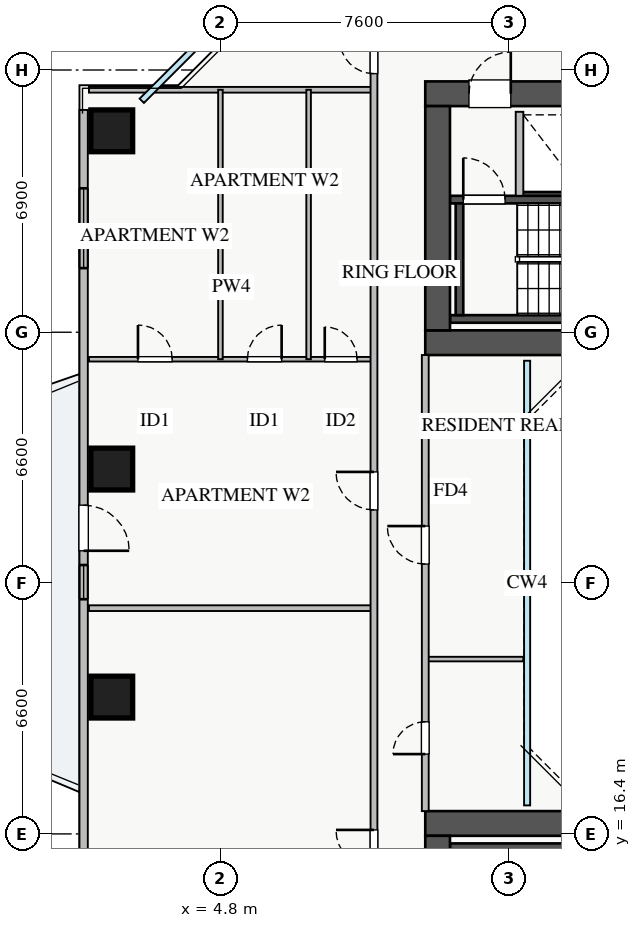
"""IFC4 building model, lengths in metres.
Left out: names, types, materials, properties, quantities, classifications, styles, units other than length and angle.
Written with IfcOpenShell. Run it as: python <this file> out.ifc"""

import sys

from ifc_helpers import new_model, si_unit, direction, frame, frame_2d, origin, origin_2d, place, context, subcontext, project, spatial, rectangle, extrude, source, transform, mapped, element, fill, save


model = new_model("IFC4")
c1 = context("Model", 3, precision=1e-05, world=origin(), true_north=direction((0.0, 1.0)))
c2 = subcontext(c1, "Body", "Model", "MODEL_VIEW")
j1 = project(units=[si_unit("LENGTHUNIT", "METRE"), si_unit("PLANEANGLEUNIT", "RADIAN")], contexts=[c1])
p1 = place(None, origin())
s1 = spatial("IfcSite", under=j1, at=p1, CompositionType="ELEMENT")
p2 = place(p1, origin())
s2 = spatial("IfcBuilding", under=s1, at=p2, CompositionType="ELEMENT")
p3 = place(p2, frame((0.0, 0.0, 113.25)))
s3 = spatial("IfcBuildingStorey", under=s2, at=p3, CompositionType="ELEMENT", Elevation=113.25)
p4 = place(p3, frame((12.68, 33.2, 0.0), z_axis=(0.0, 0.0, 1.0), x_axis=(1.0, 0.0, 0.0)))
e1 = element("IfcWall", 1, at=p4, inside=s3, PredefinedType="SHEAR", context=c2, shape_type="SweptSolid", body=[
    extrude(rectangle(XDim=1.94, YDim=0.18, at=frame_2d((0.97, 0.0))), origin(), (0.0, 0.0, 1.0), 3.07),
])
p5 = place(p3, frame((10.85, 29.95, 0.0), z_axis=(0.0, 0.0, 1.0), x_axis=(1.0, 0.0, 0.0)))
e2 = element("IfcWall", 2, at=p5, inside=s3, PredefinedType="SHEAR", context=c2, shape_type="SweptSolid", body=[
    extrude(rectangle(XDim=7.3, YDim=0.2, at=frame_2d((3.65, 0.0))), origin(), (0.0, 0.0, 1.0), 3.25),
])
p6 = place(p3, frame((10.85, 33.09, 0.0), z_axis=(0.0, 0.0, 1.0), x_axis=(1.0, 0.0, 0.0)))
e3 = element("IfcWall", 3, at=p6, inside=s3, PredefinedType="SHEAR", context=c2, shape_type="SweptSolid", body=[
    extrude(rectangle(XDim=7.3, YDim=0.2, at=frame_2d((3.65, 0.0))), origin(), (0.0, 0.0, 1.0), 3.25),
])
p7 = place(p6, frame((0.35, 0.0, 0.0)))
e4 = element("IfcOpeningElement", 4, at=p7, cuts=e3, PredefinedType="OPENING", context=c2, shape_type="SweptSolid", body=[
    extrude(rectangle(XDim=1.1, YDim=2.05, at=frame_2d((0.55, 1.025))), frame((0.0, 0.11, 0.0), z_axis=(0.0, -1.0, 0.0), x_axis=(1.0, 0.0, 0.0)), (0.0, 0.0, 1.0), 0.22),
])
p8 = place(p3, frame((11.1, 30.05, 0.0), z_axis=(0.0, 0.0, 1.0), x_axis=(0.0, 1.0, 0.0)))
e5 = element("IfcWall", 5, at=p8, inside=s3, PredefinedType="SHEAR", context=c2, shape_type="SweptSolid", body=[
    extrude(rectangle(XDim=2.94, YDim=0.2, at=frame_2d((1.47, 0.0))), origin(), (0.0, 0.0, 1.0), 3.25),
])
p9 = place(p3, frame((10.85, 16.05, 0.0), z_axis=(0.0, 0.0, 1.0), x_axis=(1.0, 0.0, 0.0)))
e6 = element("IfcWall", 6, at=p9, inside=s3, PredefinedType="SHEAR", context=c2, shape_type="SweptSolid", body=[
    extrude(rectangle(XDim=7.3, YDim=0.2, at=frame_2d((3.65, 0.0))), origin(), (0.0, 0.0, 1.0), 3.25),
])
p10 = place(p3, frame((10.2, 29.325, 0.0), z_axis=(0.0, 0.0, 1.0), x_axis=(1.0, 0.0, 0.0)))
e7 = element("IfcWall", 7, at=p10, inside=s3, PredefinedType="SHEAR", context=c2, shape_type="SweptSolid", body=[
    extrude(rectangle(XDim=17.6, YDim=0.65, at=frame_2d((8.8, 0.0))), origin(), (0.0, 0.0, 1.0), 3.25),
])
p11 = place(p3, frame((10.2, 35.875, 0.0), z_axis=(0.0, 0.0, 1.0), x_axis=(1.0, 0.0, 0.0)))
e8 = element("IfcWall", 8, at=p11, inside=s3, PredefinedType="SHEAR", context=c2, shape_type="SweptSolid", body=[
    extrude(rectangle(XDim=17.6, YDim=0.65, at=frame_2d((8.8, 0.0))), origin(), (0.0, 0.0, 1.0), 3.25),
])
p12 = place(p11, frame((1.15, 0.0, 0.0)))
e9 = element("IfcOpeningElement", 9, at=p12, cuts=e8, PredefinedType="OPENING", context=c2, shape_type="SweptSolid", body=[
    extrude(rectangle(XDim=1.1, YDim=2.05, at=frame_2d((0.55, 1.025))), frame((0.0, 0.335, 0.0), z_axis=(0.0, -1.0, 0.0), x_axis=(1.0, 0.0, 0.0)), (0.0, 0.0, 1.0), 0.67),
])
p13 = place(p11, frame((8.3, 0.0, 0.0)))
e10 = element("IfcOpeningElement", 10, at=p13, cuts=e8, PredefinedType="OPENING", context=c2, shape_type="SweptSolid", body=[
    extrude(rectangle(XDim=1.1, YDim=2.05, at=frame_2d((0.55, 1.025))), frame((0.0, 0.335, 0.0), z_axis=(0.0, -1.0, 0.0), x_axis=(1.0, 0.0, 0.0)), (0.0, 0.0, 1.0), 0.67),
])
p14 = place(p11, frame((4.9, 0.0, 0.0)))
e11 = element("IfcOpeningElement", 11, at=p14, cuts=e8, PredefinedType="OPENING", context=c2, shape_type="SweptSolid", body=[
    extrude(rectangle(XDim=1.1, YDim=2.05, at=frame_2d((0.55, 1.025))), frame((0.0, 0.335, 0.0), z_axis=(0.0, -1.0, 0.0), x_axis=(1.0, 0.0, 0.0)), (0.0, 0.0, 1.0), 0.67),
])
p15 = place(p11, frame((14.74, 0.0, 0.0)))
e12 = element("IfcOpeningElement", 12, at=p15, cuts=e8, PredefinedType="OPENING", context=c2, shape_type="SweptSolid", body=[
    extrude(rectangle(XDim=1.0, YDim=2.05, at=frame_2d((0.5, 1.025))), frame((0.0, 0.335, 0.0), z_axis=(0.0, -1.0, 0.0), x_axis=(1.0, 0.0, 0.0)), (0.0, 0.0, 1.0), 0.67),
])
p16 = place(p11, frame((10.005, 0.0, 0.0)))
e13 = element("IfcOpeningElement", 13, at=p16, cuts=e8, PredefinedType="OPENING", context=c2, shape_type="SweptSolid", body=[
    extrude(rectangle(XDim=1.0, YDim=2.05, at=frame_2d((0.5, 1.025))), frame((0.0, 0.335, 0.0), z_axis=(0.0, -1.0, 0.0), x_axis=(1.0, 0.0, 0.0)), (0.0, 0.0, 1.0), 0.67),
])
p17 = place(p11, frame((11.55, 0.0, 0.0)))
e14 = element("IfcOpeningElement", 14, at=p17, cuts=e8, PredefinedType="OPENING", context=c2, shape_type="SweptSolid", body=[
    extrude(rectangle(XDim=1.0, YDim=2.05, at=frame_2d((0.5, 1.025))), frame((0.0, 0.335, 0.0), z_axis=(0.0, -1.0, 0.0), x_axis=(1.0, 0.0, 0.0)), (0.0, 0.0, 1.0), 0.67),
])
p18 = place(p11, frame((13.215, 0.0, 0.0)))
e15 = element("IfcOpeningElement", 15, at=p18, cuts=e8, PredefinedType="OPENING", context=c2, shape_type="SweptSolid", body=[
    extrude(rectangle(XDim=1.0, YDim=2.05, at=frame_2d((0.5, 1.025))), frame((0.0, 0.335, 0.0), z_axis=(0.0, -1.0, 0.0), x_axis=(1.0, 0.0, 0.0)), (0.0, 0.0, 1.0), 0.67),
])
p19 = place(p3, frame((10.525, 29.65, 0.0), z_axis=(0.0, 0.0, 1.0), x_axis=(0.0, 1.0, 0.0)))
e16 = element("IfcWall", 16, at=p19, inside=s3, PredefinedType="SHEAR", context=c2, shape_type="SweptSolid", body=[
    extrude(rectangle(XDim=5.9, YDim=0.65, at=frame_2d((2.95, 0.0))), origin(), (0.0, 0.0, 1.0), 3.25),
])
p20 = place(p3, frame((10.2, 16.675, 0.0), z_axis=(0.0, 0.0, 1.0), x_axis=(1.0, 0.0, 0.0)))
e17 = element("IfcWall", 17, at=p20, inside=s3, PredefinedType="SHEAR", context=c2, shape_type="SweptSolid", body=[
    extrude(rectangle(XDim=17.6, YDim=0.65, at=frame_2d((8.8, 0.0))), origin(), (0.0, 0.0, 1.0), 3.25),
])
p21 = place(p3, frame((10.525, 10.45, 0.0), z_axis=(0.0, 0.0, 1.0), x_axis=(0.0, 1.0, 0.0)))
e18 = element("IfcWall", 18, at=p21, inside=s3, PredefinedType="SHEAR", context=c2, shape_type="SweptSolid", body=[
    extrude(rectangle(XDim=5.9, YDim=0.65, at=frame_2d((2.95, 0.0))), origin(), (0.0, 0.0, 1.0), 3.25),
])
m1 = source(origin(), c2, "Body", "SweptSolid", [
    extrude(rectangle(XDim=1.1, YDim=1.1, at=origin_2d()), origin(), (0.0, 0.0, 1.0), 3.25),
])
for number, where, z_axis, x_axis in (
    (19, (1.95, 34.9, 0.0), (0.0, 0.0, 1.0), (1.0, 0.0, 0.0)),
    (20, (1.95, 26.0, 0.0), (0.0, 0.0, 1.0), (1.0, 0.0, 0.0)),
    (21, (1.95, 20.0, 0.0), (0.0, 0.0, 1.0), (1.0, 0.0, 0.0)),
):
    element("IfcColumn", number, at=place(p3, frame(where, z_axis=z_axis, x_axis=x_axis)), inside=s3, PredefinedType="COLUMN", context=c2, shape_type="MappedRepresentation", body=[
        mapped(m1, transform((0.0, 0.0, 0.0), x_axis=(1.0, 0.0, 0.0), y_axis=(0.0, 1.0, 0.0), z_axis=(0.0, 0.0, 1.0), scale=1.0)),
    ])
p22 = place(p3, frame((1.21, 10.55, 0.0), z_axis=(0.0, 0.0, 1.0), x_axis=(0.0, 1.0, 0.0)))
e22 = element("IfcWall", 22, at=p22, inside=s3, PredefinedType="STANDARD", context=c2, shape_type="SweptSolid", body=[
    extrude(rectangle(XDim=24.9, YDim=0.22, at=frame_2d((12.45, 0.0))), origin(), (0.0, 0.0, 1.0), 2.61),
])
p23 = place(p22, frame((13.3, 0.0, 0.0)))
e23 = element("IfcOpeningElement", 23, at=p23, cuts=e22, PredefinedType="OPENING", context=c2, shape_type="SweptSolid", body=[
    extrude(rectangle(XDim=1.2, YDim=2.1, at=frame_2d((0.6, 1.05))), frame((0.0, 0.12, 0.0), z_axis=(0.0, -1.0, 0.0), x_axis=(1.0, 0.0, 0.0)), (0.0, 0.0, 1.0), 0.24),
])
p24 = place(p22, frame((1.912, 0.0, 0.9)))
e24 = element("IfcOpeningElement", 24, at=p24, cuts=e22, PredefinedType="OPENING", context=c2, shape_type="SweptSolid", body=[
    extrude(rectangle(XDim=2.4, YDim=1.48, at=frame_2d((1.2, 0.74))), frame((0.0, 0.12, 0.0), z_axis=(0.0, -1.0, 0.0), x_axis=(1.0, 0.0, 0.0)), (0.0, 0.0, 1.0), 0.24),
])
p25 = place(p22, frame((20.737, 0.0, 0.9)))
e25 = element("IfcOpeningElement", 25, at=p25, cuts=e22, PredefinedType="OPENING", context=c2, shape_type="SweptSolid", body=[
    extrude(rectangle(XDim=2.1, YDim=1.48, at=frame_2d((1.05, 0.74))), frame((0.0, 0.12, 0.0), z_axis=(0.0, -1.0, 0.0), x_axis=(1.0, 0.0, 0.0)), (0.0, 0.0, 1.0), 0.24),
])
p26 = place(p22, frame((12.025, 0.0, 0.9)))
e26 = element("IfcOpeningElement", 26, at=p26, cuts=e22, PredefinedType="OPENING", context=c2, shape_type="SweptSolid", body=[
    extrude(rectangle(XDim=0.9, YDim=1.2, at=frame_2d((0.45, 0.6))), frame((0.0, 0.12, 0.0), z_axis=(0.0, -1.0, 0.0), x_axis=(1.0, 0.0, 0.0)), (0.0, 0.0, 1.0), 0.24),
])
p27 = place(p3, frame((12.68, 33.19, 0.0), z_axis=(0.0, 0.0, 1.0), x_axis=(0.0, 1.0, 0.0)))
e27 = element("IfcWall", 27, at=p27, inside=s3, PredefinedType="PARTITIONING", context=c2, shape_type="SweptSolid", body=[
    extrude(rectangle(XDim=2.21, YDim=0.2, at=frame_2d((1.105, 0.0))), origin(), (0.0, 0.0, 1.0), 3.07),
])
p28 = place(p3, frame((1.35, 35.98, 0.0), z_axis=(0.0, 0.0, 1.0), x_axis=(1.0, 0.0, 0.0)))
e28 = element("IfcWall", 28, at=p28, inside=s3, PredefinedType="PARTITIONING", context=c2, shape_type="SweptSolid", body=[
    extrude(rectangle(XDim=7.5, YDim=0.15, at=frame_2d((3.75, 0.0))), origin(), (0.0, 0.0, 1.0), 3.07),
])
p29 = place(p3, frame((1.35, 28.89, 0.0), z_axis=(0.0, 0.0, 1.0), x_axis=(1.0, 0.0, 0.0)))
e29 = element("IfcWall", 29, at=p29, inside=s3, PredefinedType="PLUMBINGWALL", context=c2, shape_type="SweptSolid", body=[
    extrude(rectangle(XDim=7.5, YDim=0.12, at=frame_2d((3.75, 0.0))), origin(), (0.0, 0.0, 1.0), 3.07),
])
p30 = place(p29, frame((1.29, 0.0, 0.0)))
e30 = element("IfcOpeningElement", 30, at=p30, cuts=e29, PredefinedType="OPENING", context=c2, shape_type="SweptSolid", body=[
    extrude(rectangle(XDim=0.9, YDim=2.05, at=frame_2d((0.45, 1.025))), frame((0.0, 0.07, 0.0), z_axis=(0.0, -1.0, 0.0), x_axis=(1.0, 0.0, 0.0)), (0.0, 0.0, 1.0), 0.14),
])
p31 = place(p29, frame((4.17, 0.0, 0.0)))
e31 = element("IfcOpeningElement", 31, at=p31, cuts=e29, PredefinedType="OPENING", context=c2, shape_type="SweptSolid", body=[
    extrude(rectangle(XDim=0.9, YDim=2.05, at=frame_2d((0.45, 1.025))), frame((0.0, 0.07, 0.0), z_axis=(0.0, -1.0, 0.0), x_axis=(1.0, 0.0, 0.0)), (0.0, 0.0, 1.0), 0.14),
])
p32 = place(p29, frame((6.205, 0.0, 0.0)))
e32 = element("IfcOpeningElement", 32, at=p32, cuts=e29, PredefinedType="OPENING", context=c2, shape_type="SweptSolid", body=[
    extrude(rectangle(XDim=0.85, YDim=2.05, at=frame_2d((0.425, 1.025))), frame((0.0, 0.07, 0.0), z_axis=(0.0, -1.0, 0.0), x_axis=(1.0, 0.0, 0.0)), (0.0, 0.0, 1.0), 0.14),
])
p33 = place(p3, frame((4.81, 28.89, 0.0), z_axis=(0.0, 0.0, 1.0), x_axis=(0.0, 1.0, 0.0)))
e33 = element("IfcWall", 33, at=p33, inside=s3, PredefinedType="PLUMBINGWALL", context=c2, shape_type="SweptSolid", body=[
    extrude(rectangle(XDim=7.09, YDim=0.12, at=frame_2d((3.545, 0.0))), origin(), (0.0, 0.0, 1.0), 3.07),
])
p34 = place(p3, frame((7.13, 28.89, 0.0), z_axis=(0.0, 0.0, 1.0), x_axis=(0.0, 1.0, 0.0)))
e34 = element("IfcWall", 34, at=p34, inside=s3, PredefinedType="PLUMBINGWALL", context=c2, shape_type="SweptSolid", body=[
    extrude(rectangle(XDim=7.09, YDim=0.12, at=frame_2d((3.545, 0.0))), origin(), (0.0, 0.0, 1.0), 2.577),
])
p35 = place(p3, frame((1.35, 22.34, 0.0), z_axis=(0.0, 0.0, 1.0), x_axis=(1.0, 0.0, 0.0)))
e35 = element("IfcWall", 35, at=p35, inside=s3, PredefinedType="PARTITIONING", context=c2, shape_type="SweptSolid", body=[
    extrude(rectangle(XDim=7.5, YDim=0.15, at=frame_2d((3.75, 0.0))), origin(), (0.0, 0.0, 1.0), 3.07),
])
p36 = place(p3, frame((8.85, 8.25, 0.0), z_axis=(0.0, 0.0, 1.0), x_axis=(0.0, 1.0, 0.0)))
e36 = element("IfcWall", 36, at=p36, inside=s3, PredefinedType="PARTITIONING", context=c2, shape_type="SweptSolid", body=[
    extrude(rectangle(XDim=29.5, YDim=0.18, at=frame_2d((14.75, 0.0))), origin(), (0.0, 0.0, 1.0), 3.07),
])
p37 = place(p36, frame((28.155, 0.0, 0.0)))
e37 = element("IfcOpeningElement", 37, at=p37, cuts=e36, PredefinedType="OPENING", context=c2, shape_type="SweptSolid", body=[
    extrude(rectangle(XDim=0.9, YDim=2.05, at=frame_2d((0.45, 1.025))), frame((0.0, 0.1, 0.0), z_axis=(0.0, -1.0, 0.0), x_axis=(1.0, 0.0, 0.0)), (0.0, 0.0, 1.0), 0.2),
])
p38 = place(p36, frame((0.27, 0.0, 0.0)))
e38 = element("IfcOpeningElement", 38, at=p38, cuts=e36, PredefinedType="OPENING", context=c2, shape_type="SweptSolid", body=[
    extrude(rectangle(XDim=0.9, YDim=2.05, at=frame_2d((0.45, 1.025))), frame((0.0, 0.1, 0.0), z_axis=(0.0, -1.0, 0.0), x_axis=(1.0, 0.0, 0.0)), (0.0, 0.0, 1.0), 0.2),
])
p39 = place(p36, frame((7.255, 0.0, 0.0)))
e39 = element("IfcOpeningElement", 39, at=p39, cuts=e36, PredefinedType="OPENING", context=c2, shape_type="SweptSolid", body=[
    extrude(rectangle(XDim=1.0, YDim=2.05, at=frame_2d((0.5, 1.025))), frame((0.0, 0.1, 0.0), z_axis=(0.0, -1.0, 0.0), x_axis=(1.0, 0.0, 0.0)), (0.0, 0.0, 1.0), 0.2),
])
p40 = place(p36, frame((16.675, 0.0, 0.0)))
e40 = element("IfcOpeningElement", 40, at=p40, cuts=e36, PredefinedType="OPENING", context=c2, shape_type="SweptSolid", body=[
    extrude(rectangle(XDim=1.0, YDim=2.05, at=frame_2d((0.5, 1.025))), frame((0.0, 0.1, 0.0), z_axis=(0.0, -1.0, 0.0), x_axis=(1.0, 0.0, 0.0)), (0.0, 0.0, 1.0), 0.2),
])
p41 = place(p3, frame((10.2, 21.0, 0.0), z_axis=(0.0, 0.0, 1.0), x_axis=(1.0, 0.0, 0.0)))
e41 = element("IfcWall", 41, at=p41, inside=s3, PredefinedType="PLUMBINGWALL", context=c2, shape_type="SweptSolid", body=[
    extrude(rectangle(XDim=2.58, YDim=0.12, at=frame_2d((1.29, 0.0))), origin(), (0.0, 0.0, 1.0), 3.07),
])
p42 = place(p3, frame((10.2, 17.0, 0.0), z_axis=(0.0, 0.0, 1.0), x_axis=(0.0, 1.0, 0.0)))
e42 = element("IfcWall", 42, at=p42, inside=s3, PredefinedType="PARTITIONING", context=c2, shape_type="SweptSolid", body=[
    extrude(rectangle(XDim=12.0, YDim=0.18, at=frame_2d((6.0, 0.0))), origin(), (0.0, 0.0, 1.0), 3.07),
])
p43 = place(p42, frame((1.5, 0.0, 0.0)))
e43 = element("IfcOpeningElement", 43, at=p43, cuts=e42, PredefinedType="OPENING", context=c2, shape_type="SweptSolid", body=[
    extrude(rectangle(XDim=0.85, YDim=2.05, at=frame_2d((0.425, 1.025))), frame((0.0, 0.1, 0.0), z_axis=(0.0, -1.0, 0.0), x_axis=(1.0, 0.0, 0.0)), (0.0, 0.0, 1.0), 0.2),
])
p44 = place(p42, frame((6.5, 0.0, 0.0)))
e44 = element("IfcOpeningElement", 44, at=p44, cuts=e42, PredefinedType="OPENING", context=c2, shape_type="SweptSolid", body=[
    extrude(rectangle(XDim=1.0, YDim=2.05, at=frame_2d((0.5, 1.025))), frame((0.0, 0.1, 0.0), z_axis=(0.0, -1.0, 0.0), x_axis=(1.0, 0.0, 0.0)), (0.0, 0.0, 1.0), 0.2),
])
m2 = source(origin(), c2, "Body", "SweptSolid", [
    extrude(rectangle(XDim=1.2, YDim=2.1, at=frame_2d((0.6, 1.05))), frame((0.0, 0.025, 0.0), z_axis=(0.0, -1.0, 0.0), x_axis=(1.0, 0.0, 0.0)), (0.0, 0.0, 1.0), 0.05),
])
p45 = place(p23, frame((1.2, 0.0, 0.0), z_axis=(0.0, 0.0, 1.0), x_axis=(-1.0, 0.0, 0.0)))
e45 = element("IfcDoor", 45, at=p45, inside=s3, OperationType="SINGLE_SWING_LEFT", PredefinedType="DOOR", context=c2, shape_type="MappedRepresentation", body=[
    mapped(m2, transform((0.0, 0.0, 0.0), x_axis=(1.0, 0.0, 0.0), y_axis=(0.0, 1.0, 0.0), z_axis=(0.0, 0.0, 1.0), scale=1.0)),
])
fill(e23, e45)
m3 = source(origin(), c2, "Body", "SweptSolid", [
    extrude(rectangle(XDim=2.1, YDim=1.48, at=frame_2d((1.05, 0.74))), frame((0.0, 0.03, 0.0), z_axis=(0.0, -1.0, 0.0), x_axis=(1.0, 0.0, 0.0)), (0.0, 0.0, 1.0), 0.06),
])
p46 = place(p25, origin())
e46 = element("IfcWindow", 46, at=p46, inside=s3, PartitioningType="TRIPLE_PANEL_VERTICAL", PredefinedType="WINDOW", context=c2, shape_type="MappedRepresentation", body=[
    mapped(m3, transform((0.0, 0.0, 0.0), x_axis=(1.0, 0.0, 0.0), y_axis=(0.0, 1.0, 0.0), z_axis=(0.0, 0.0, 1.0), scale=1.0)),
])
fill(e25, e46)
m4 = source(origin(), c2, "Body", "SweptSolid", [
    extrude(rectangle(XDim=1.1, YDim=2.05, at=frame_2d((0.55, 1.025))), frame((0.0, 0.025, 0.0), z_axis=(0.0, -1.0, 0.0), x_axis=(1.0, 0.0, 0.0)), (0.0, 0.0, 1.0), 0.05),
])
p47 = place(p12, origin())
e47 = element("IfcDoor", 47, at=p47, inside=s3, OperationType="SINGLE_SWING_RIGHT", PredefinedType="DOOR", context=c2, shape_type="MappedRepresentation", body=[
    mapped(m4, transform((0.0, 0.0, 0.0), x_axis=(1.0, 0.0, 0.0), y_axis=(0.0, 1.0, 0.0), z_axis=(0.0, 0.0, 1.0), scale=1.0)),
])
fill(e9, e47)
p48 = place(p7, origin())
e48 = element("IfcDoor", 48, at=p48, inside=s3, OperationType="SINGLE_SWING_LEFT", PredefinedType="DOOR", context=c2, shape_type="MappedRepresentation", body=[
    mapped(m4, transform((0.0, 0.0, 0.0), x_axis=(1.0, 0.0, 0.0), y_axis=(0.0, 1.0, 0.0), z_axis=(0.0, 0.0, 1.0), scale=1.0)),
])
fill(e4, e48)
m5 = source(origin(), c2, "Body", "SweptSolid", [
    extrude(rectangle(XDim=0.9, YDim=2.05, at=frame_2d((0.45, 1.025))), frame((0.0, 0.025, 0.0), z_axis=(0.0, -1.0, 0.0), x_axis=(1.0, 0.0, 0.0)), (0.0, 0.0, 1.0), 0.05),
])
p49 = place(p30, origin())
e49 = element("IfcDoor", 49, at=p49, inside=s3, OperationType="SINGLE_SWING_LEFT", PredefinedType="DOOR", context=c2, shape_type="MappedRepresentation", body=[
    mapped(m5, transform((0.0, 0.0, 0.0), x_axis=(1.0, 0.0, 0.0), y_axis=(0.0, 1.0, 0.0), z_axis=(0.0, 0.0, 1.0), scale=1.0)),
])
fill(e30, e49)
p50 = place(p31, origin())
e50 = element("IfcDoor", 50, at=p50, inside=s3, OperationType="SINGLE_SWING_RIGHT", PredefinedType="DOOR", context=c2, shape_type="MappedRepresentation", body=[
    mapped(m5, transform((0.0, 0.0, 0.0), x_axis=(1.0, 0.0, 0.0), y_axis=(0.0, 1.0, 0.0), z_axis=(0.0, 0.0, 1.0), scale=1.0)),
])
fill(e31, e50)
m6 = source(origin(), c2, "Body", "SweptSolid", [
    extrude(rectangle(XDim=0.85, YDim=2.05, at=frame_2d((0.425, 1.025))), frame((0.0, 0.025, 0.0), z_axis=(0.0, -1.0, 0.0), x_axis=(1.0, 0.0, 0.0)), (0.0, 0.0, 1.0), 0.05),
])
p51 = place(p32, origin())
e51 = element("IfcDoor", 51, at=p51, inside=s3, OperationType="SINGLE_SWING_LEFT", PredefinedType="DOOR", context=c2, shape_type="MappedRepresentation", body=[
    mapped(m6, transform((0.0, 0.0, 0.0), x_axis=(1.0, 0.0, 0.0), y_axis=(0.0, 1.0, 0.0), z_axis=(0.0, 0.0, 1.0), scale=1.0)),
])
fill(e32, e51)
p52 = place(p37, origin())
e52 = element("IfcDoor", 52, at=p52, inside=s3, OperationType="SINGLE_SWING_RIGHT", PredefinedType="DOOR", context=c2, shape_type="MappedRepresentation", body=[
    mapped(m5, transform((0.0, 0.0, 0.0), x_axis=(1.0, 0.0, 0.0), y_axis=(0.0, 1.0, 0.0), z_axis=(0.0, 0.0, 1.0), scale=1.0)),
])
fill(e37, e52)
m7 = source(origin(), c2, "Body", "SweptSolid", [
    extrude(rectangle(XDim=1.0, YDim=2.05, at=frame_2d((0.5, 1.025))), frame((0.0, 0.025, 0.0), z_axis=(0.0, -1.0, 0.0), x_axis=(1.0, 0.0, 0.0)), (0.0, 0.0, 1.0), 0.05),
])
p53 = place(p39, origin())
e53 = element("IfcDoor", 53, at=p53, inside=s3, OperationType="SINGLE_SWING_RIGHT", PredefinedType="DOOR", context=c2, shape_type="MappedRepresentation", body=[
    mapped(m7, transform((0.0, 0.0, 0.0), x_axis=(1.0, 0.0, 0.0), y_axis=(0.0, 1.0, 0.0), z_axis=(0.0, 0.0, 1.0), scale=1.0)),
])
fill(e39, e53)
p54 = place(p40, origin())
e54 = element("IfcDoor", 54, at=p54, inside=s3, OperationType="SINGLE_SWING_RIGHT", PredefinedType="DOOR", context=c2, shape_type="MappedRepresentation", body=[
    mapped(m7, transform((0.0, 0.0, 0.0), x_axis=(1.0, 0.0, 0.0), y_axis=(0.0, 1.0, 0.0), z_axis=(0.0, 0.0, 1.0), scale=1.0)),
])
fill(e40, e54)
p55 = place(p43, origin())
e55 = element("IfcDoor", 55, at=p55, inside=s3, OperationType="SINGLE_SWING_LEFT", PredefinedType="DOOR", context=c2, shape_type="MappedRepresentation", body=[
    mapped(m6, transform((0.0, 0.0, 0.0), x_axis=(1.0, 0.0, 0.0), y_axis=(0.0, 1.0, 0.0), z_axis=(0.0, 0.0, 1.0), scale=1.0)),
])
fill(e43, e55)
p56 = place(p44, origin())
e56 = element("IfcDoor", 56, at=p56, inside=s3, OperationType="SINGLE_SWING_RIGHT", PredefinedType="DOOR", context=c2, shape_type="MappedRepresentation", body=[
    mapped(m7, transform((0.0, 0.0, 0.0), x_axis=(1.0, 0.0, 0.0), y_axis=(0.0, 1.0, 0.0), z_axis=(0.0, 0.0, 1.0), scale=1.0)),
])
fill(e44, e56)
m8 = source(origin(), c2, "Body", "SweptSolid", [
    extrude(rectangle(XDim=0.9, YDim=1.2, at=frame_2d((0.45, 0.6))), frame((0.0, 0.03, 0.0), z_axis=(0.0, -1.0, 0.0), x_axis=(1.0, 0.0, 0.0)), (0.0, 0.0, 1.0), 0.06),
])
p57 = place(p26, origin())
e57 = element("IfcWindow", 57, at=p57, inside=s3, PartitioningType="SINGLE_PANEL", PredefinedType="WINDOW", context=c2, shape_type="MappedRepresentation", body=[
    mapped(m8, transform((0.0, 0.0, 0.0), x_axis=(1.0, 0.0, 0.0), y_axis=(0.0, 1.0, 0.0), z_axis=(0.0, 0.0, 1.0), scale=1.0)),
])
fill(e26, e57)
save(model, sys.argv[1])
